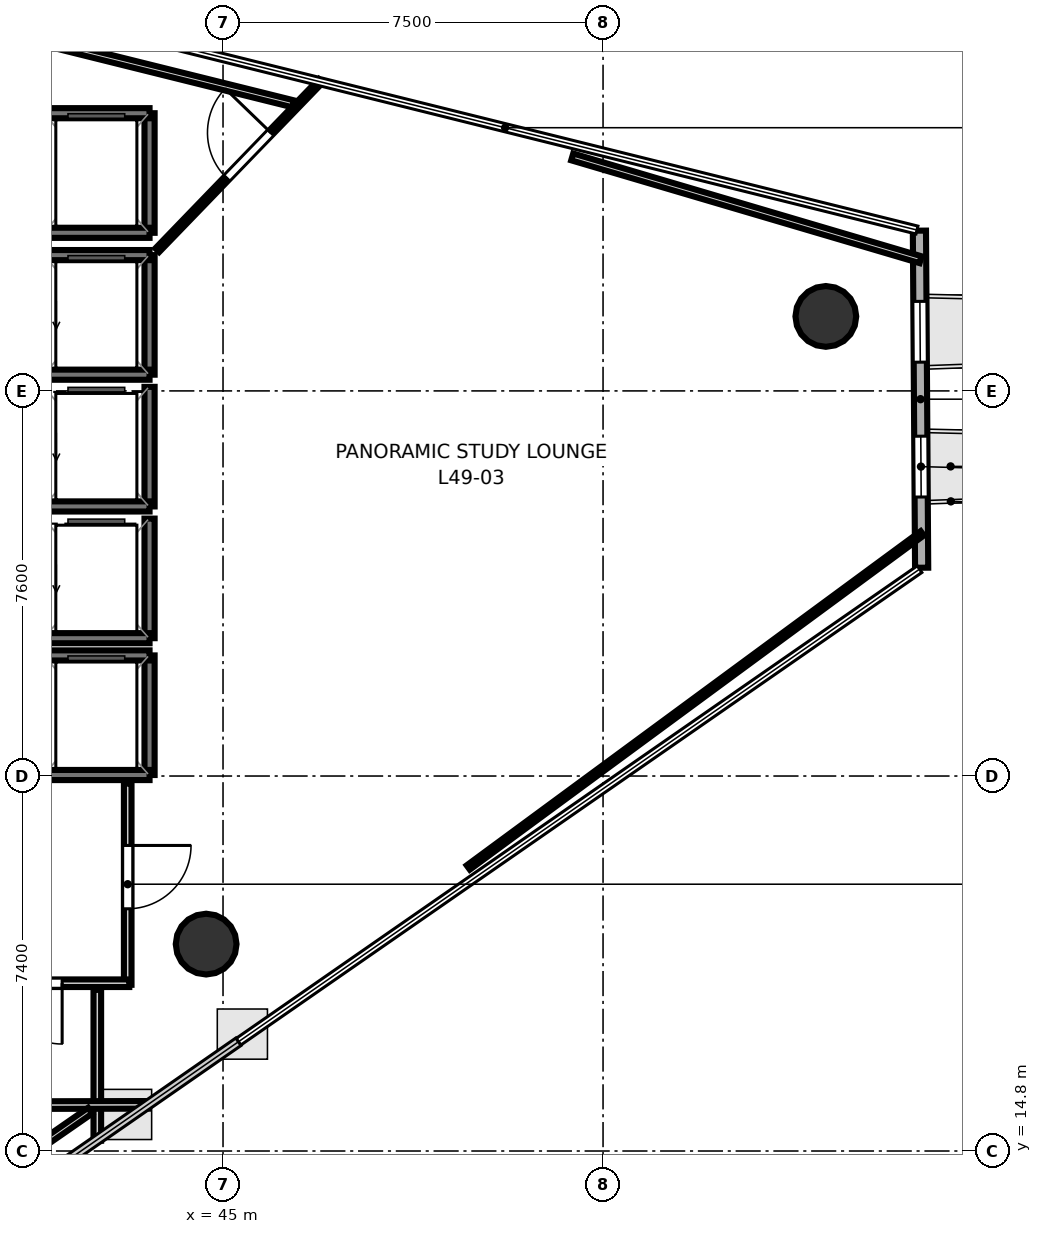
"""IFC4 building model, lengths in metres.
Left out: names, types, materials, properties, quantities, classifications, styles, units other than length and angle.
Written with IfcOpenShell. Run it as: python <this file> out.ifc"""

import sys

from ifc_helpers import new_model, si_unit, direction, frame, frame_2d, origin, origin_2d, place, context, subcontext, project, spatial, rectangle, hollow_circle, extrude, element, fill, save


model = new_model("IFC4")
c1 = context("Model", 3, precision=1e-05, world=origin(), true_north=direction((0.0, 1.0)))
c2 = subcontext(c1, "Body", "Model", "MODEL_VIEW")
j1 = project(units=[si_unit("LENGTHUNIT", "METRE"), si_unit("PLANEANGLEUNIT", "RADIAN")], contexts=[c1])
p1 = place(None, origin())
s1 = spatial("IfcSite", under=j1, at=p1, CompositionType="ELEMENT")
p2 = place(p1, origin())
s2 = spatial("IfcBuilding", under=s1, at=p2, CompositionType="ELEMENT")
p3 = place(p2, frame((0.0, 0.0, 192.9)))
s3 = spatial("IfcBuildingStorey", under=s2, at=p3, CompositionType="ELEMENT", Elevation=192.9)
for number, where, z_axis, x_axis in (
    (1, (56.897, 31.27, 0.0), (0.0, 0.0, 1.0), (1.0, 0.0, 0.0)),
    (2, (44.667, 18.883, 0.0), (0.0, 0.0, 1.0), (1.0, 0.0, 0.0)),
):
    element("IfcColumn", number, at=place(p3, frame(where, z_axis=z_axis, x_axis=x_axis)), inside=s3, PredefinedType="COLUMN", context=c2, shape_type="SweptSolid", body=[
        extrude(hollow_circle(Radius=0.6, WallThickness=0.03, at=origin_2d()), origin(), (0.0, 0.0, 1.0), 3.7),
    ])
p4 = place(p3, frame((58.788, 26.311, 0.0), z_axis=(0.0, 0.0, 1.0), x_axis=(-0.006569629932, 0.999978419748, 0.0)))
e3 = element("IfcWall", 3, at=p4, inside=s3, PredefinedType="SOLIDWALL", context=c2, shape_type="SweptSolid", body=[
    extrude(rectangle(XDim=6.652, YDim=0.26, at=frame_2d((3.326, 0.0))), origin(), (0.0, 0.0, 1.0), 3.52),
])
p5 = place(p4, frame((1.396, 0.0, 0.9)))
e4 = element("IfcOpeningElement", 4, at=p5, cuts=e3, PredefinedType="OPENING", context=c2, shape_type="SweptSolid", body=[
    extrude(rectangle(XDim=1.2, YDim=2.0, at=frame_2d((0.6, 1.0))), frame((0.0, 0.14, 0.0), z_axis=(0.0, -1.0, 0.0), x_axis=(1.0, 0.0, 0.0)), (0.0, 0.0, 1.0), 0.28),
])
p6 = place(p4, frame((4.056, 0.0, 0.9)))
e5 = element("IfcOpeningElement", 5, at=p6, cuts=e3, PredefinedType="OPENING", context=c2, shape_type="SweptSolid", body=[
    extrude(rectangle(XDim=1.2, YDim=2.0, at=frame_2d((0.6, 1.0))), frame((0.0, 0.14, 0.0), z_axis=(0.0, -1.0, 0.0), x_axis=(1.0, 0.0, 0.0)), (0.0, 0.0, 1.0), 0.28),
])
p7 = place(p3, frame((43.55, 30.12, 0.0), z_axis=(0.0, 0.0, 1.0), x_axis=(0.0, 1.0, 0.0)))
e6 = element("IfcWall", 6, at=p7, inside=s3, PredefinedType="SOLIDWALL", context=c2, shape_type="SweptSolid", body=[
    extrude(rectangle(XDim=2.36, YDim=0.2, at=frame_2d((1.18, 0.0))), origin(), (0.0, 0.0, 1.0), 3.52),
])
for number, where, z_axis, x_axis in (
    (7, (41.45, 32.48, 0.0), (0.0, 0.0, 1.0), (1.0, 0.0, 0.0)),
    (8, (41.45, 30.12, 0.0), (0.0, 0.0, 1.0), (1.0, 0.0, 0.0)),
):
    element("IfcWall", number, at=place(p3, frame(where, z_axis=z_axis, x_axis=x_axis)), inside=s3, PredefinedType="SOLIDWALL", context=c2, shape_type="SweptSolid", body=[
        extrude(rectangle(XDim=2.1, YDim=0.2, at=frame_2d((1.05, 0.0))), origin(), (0.0, 0.0, 1.0), 3.52),
    ])
p8 = place(p3, frame((43.55, 27.52, 0.0), z_axis=(0.0, 0.0, 1.0), x_axis=(0.0, 1.0, 0.0)))
e9 = element("IfcWall", 9, at=p8, inside=s3, PredefinedType="SOLIDWALL", context=c2, shape_type="SweptSolid", body=[
    extrude(rectangle(XDim=2.36, YDim=0.2, at=frame_2d((1.18, 0.0))), origin(), (0.0, 0.0, 1.0), 3.52),
])
p9 = place(p3, frame((41.45, 27.52, 0.0), z_axis=(0.0, 0.0, 1.0), x_axis=(1.0, 0.0, 0.0)))
e10 = element("IfcWall", 10, at=p9, inside=s3, PredefinedType="SOLIDWALL", context=c2, shape_type="SweptSolid", body=[
    extrude(rectangle(XDim=2.1, YDim=0.2, at=frame_2d((1.05, 0.0))), origin(), (0.0, 0.0, 1.0), 3.52),
])
p10 = place(p3, frame((43.55, 24.92, 0.0), z_axis=(0.0, 0.0, 1.0), x_axis=(0.0, 1.0, 0.0)))
e11 = element("IfcWall", 11, at=p10, inside=s3, PredefinedType="SOLIDWALL", context=c2, shape_type="SweptSolid", body=[
    extrude(rectangle(XDim=2.36, YDim=0.2, at=frame_2d((1.18, 0.0))), origin(), (0.0, 0.0, 1.0), 3.52),
])
p11 = place(p3, frame((41.45, 24.92, 0.0), z_axis=(0.0, 0.0, 1.0), x_axis=(1.0, 0.0, 0.0)))
e12 = element("IfcWall", 12, at=p11, inside=s3, PredefinedType="SOLIDWALL", context=c2, shape_type="SweptSolid", body=[
    extrude(rectangle(XDim=2.1, YDim=0.2, at=frame_2d((1.05, 0.0))), origin(), (0.0, 0.0, 1.0), 3.52),
])
p12 = place(p3, frame((43.55, 22.22, 0.0), z_axis=(0.0, 0.0, 1.0), x_axis=(0.0, 1.0, 0.0)))
e13 = element("IfcWall", 13, at=p12, inside=s3, PredefinedType="SOLIDWALL", context=c2, shape_type="SweptSolid", body=[
    extrude(rectangle(XDim=2.36, YDim=0.2, at=frame_2d((1.18, 0.0))), origin(), (0.0, 0.0, 1.0), 3.52),
])
for number, where, z_axis, x_axis in (
    (14, (41.45, 24.58, 0.0), (0.0, 0.0, 1.0), (1.0, 0.0, 0.0)),
    (15, (41.45, 22.22, 0.0), (0.0, 0.0, 1.0), (1.0, 0.0, 0.0)),
):
    element("IfcWall", number, at=place(p3, frame(where, z_axis=z_axis, x_axis=x_axis)), inside=s3, PredefinedType="SOLIDWALL", context=c2, shape_type="SweptSolid", body=[
        extrude(rectangle(XDim=2.1, YDim=0.2, at=frame_2d((1.05, 0.0))), origin(), (0.0, 0.0, 1.0), 3.52),
    ])
p13 = place(p3, frame((43.55, 32.92, 0.0), z_axis=(0.0, 0.0, 1.0), x_axis=(0.0, 1.0, 0.0)))
e16 = element("IfcWall", 16, at=p13, inside=s3, PredefinedType="SOLIDWALL", context=c2, shape_type="SweptSolid", body=[
    extrude(rectangle(XDim=2.36, YDim=0.2, at=frame_2d((1.18, 0.0))), origin(), (0.0, 0.0, 1.0), 3.52),
])
for number, where, z_axis, x_axis in (
    (17, (41.45, 35.28, 0.0), (0.0, 0.0, 1.0), (1.0, 0.0, 0.0)),
    (18, (41.45, 32.92, 0.0), (0.0, 0.0, 1.0), (1.0, 0.0, 0.0)),
):
    element("IfcWall", number, at=place(p3, frame(where, z_axis=z_axis, x_axis=x_axis)), inside=s3, PredefinedType="SOLIDWALL", context=c2, shape_type="SweptSolid", body=[
        extrude(rectangle(XDim=2.1, YDim=0.2, at=frame_2d((1.05, 0.0))), origin(), (0.0, 0.0, 1.0), 3.52),
    ])
p14 = place(p3, frame((43.119, 22.05, 0.0), z_axis=(0.0, 0.0, 1.0), x_axis=(0.0, -1.0, 0.0)))
e19 = element("IfcWall", 19, at=p14, inside=s3, PredefinedType="PARTITIONING", context=c2, shape_type="SweptSolid", body=[
    extrude(rectangle(XDim=3.97, YDim=0.15, at=frame_2d((1.985, 0.0))), origin(), (0.0, 0.0, 1.0), 2.84),
])
p15 = place(p14, frame((1.22, 0.0, 0.0)))
e20 = element("IfcOpeningElement", 20, at=p15, cuts=e19, PredefinedType="OPENING", context=c2, shape_type="SweptSolid", body=[
    extrude(rectangle(XDim=1.25, YDim=2.2, at=frame_2d((0.625, 1.1))), frame((0.0, 0.085, 0.0), z_axis=(0.0, -1.0, 0.0), x_axis=(1.0, 0.0, 0.0)), (0.0, 0.0, 1.0), 0.17),
])
p16 = place(p3, frame((43.15, 18.111, 0.0), z_axis=(0.0, 0.0, 1.0), x_axis=(-1.0, 0.0, 0.0)))
e21 = element("IfcWall", 21, at=p16, inside=s3, PredefinedType="PARTITIONING", context=c2, shape_type="SweptSolid", body=[
    extrude(rectangle(XDim=2.73, YDim=0.15, at=frame_2d((1.365, 0.0))), origin(), (0.0, 0.0, 1.0), 2.84),
])
p17 = place(p16, frame((1.325, 0.0, 0.0)))
e22 = element("IfcOpeningElement", 22, at=p17, cuts=e21, PredefinedType="OPENING", context=c2, shape_type="SweptSolid", body=[
    extrude(rectangle(XDim=1.2, YDim=2.15, at=frame_2d((0.6, 1.075))), frame((0.0, 0.085, 0.0), z_axis=(0.0, -1.0, 0.0), x_axis=(1.0, 0.0, 0.0)), (0.0, 0.0, 1.0), 0.17),
])
p18 = place(p3, frame((42.519, 17.98, 0.0), z_axis=(0.0, 0.0, 1.0), x_axis=(0.0, -1.0, 0.0)))
e23 = element("IfcWall", 23, at=p18, inside=s3, PredefinedType="PARTITIONING", context=c2, shape_type="SweptSolid", body=[
    extrude(rectangle(XDim=2.977, YDim=0.15, at=frame_2d((1.488, 0.0))), origin(), (0.0, 0.0, 1.0), 2.84),
])
p19 = place(p3, frame((43.53, 15.711, 0.0), z_axis=(0.0, 0.0, 1.0), x_axis=(-0.999998062252, -0.00196862718, 0.0)))
e24 = element("IfcWall", 24, at=p19, inside=s3, PredefinedType="PARTITIONING", context=c2, shape_type="SweptSolid", body=[
    extrude(rectangle(XDim=15.13, YDim=0.15, at=frame_2d((7.565, 0.0))), origin(), (0.0, 0.0, 1.0), 2.84),
])
p20 = place(p19, frame((5.813, 0.0, 0.0)))
e25 = element("IfcOpeningElement", 25, at=p20, cuts=e24, PredefinedType="OPENING", context=c2, shape_type="SweptSolid", body=[
    extrude(rectangle(XDim=1.25, YDim=2.2, at=frame_2d((0.625, 1.1))), frame((0.0, 0.085, 0.0), z_axis=(0.0, -1.0, 0.0), x_axis=(1.0, 0.0, 0.0)), (0.0, 0.0, 1.0), 0.17),
])
p21 = place(p3, frame((42.377, 15.595, 0.0), z_axis=(0.0, 0.0, 1.0), x_axis=(-0.821614609727, -0.570043360704, 0.0)))
e26 = element("IfcWall", 26, at=p21, inside=s3, PredefinedType="PARTITIONING", context=c2, shape_type="SweptSolid", body=[
    extrude(rectangle(XDim=8.543, YDim=0.14, at=frame_2d((4.271, 0.0))), origin(), (0.0, 0.0, 1.0), 2.84),
])
p22 = place(p3, frame((43.702, 32.576, 0.0), z_axis=(0.0, 0.0, 1.0), x_axis=(0.694641433789, 0.719356155506, 0.0)))
e27 = element("IfcWall", 27, at=p22, inside=s3, PredefinedType="PARTITIONING", context=c2, shape_type="SweptSolid", body=[
    extrude(rectangle(XDim=4.643, YDim=0.105, at=frame_2d((2.321, 0.0))), origin(), (0.0, 0.0, 1.0), 2.84),
])
p23 = place(p22, frame((1.976, 0.0, 0.0)))
e28 = element("IfcOpeningElement", 28, at=p23, cuts=e27, PredefinedType="OPENING", context=c2, shape_type="SweptSolid", body=[
    extrude(rectangle(XDim=1.25, YDim=2.2, at=frame_2d((0.625, 1.1))), frame((0.0, 0.062, 0.0), z_axis=(0.0, -1.0, 0.0), x_axis=(1.0, 0.0, 0.0)), (0.0, 0.0, 1.0), 0.125),
])
p24 = place(p3, frame((51.892, 34.418, 0.0), z_axis=(0.0, 0.0, 1.0), x_axis=(0.959115663903, -0.283014387012, 0.0)))
e29 = element("IfcWall", 29, at=p24, inside=s3, PredefinedType="PARTITIONING", context=c2, shape_type="SweptSolid", body=[
    extrude(rectangle(XDim=7.168, YDim=0.14, at=frame_2d((3.584, 0.0))), origin(), (0.0, 0.0, 1.0), 2.84),
])
p25 = place(p3, frame((58.8, 26.99, 0.0), z_axis=(0.0, 0.0, 1.0), x_axis=(-0.805363512082, -0.592781252578, 0.0)))
e30 = element("IfcWall", 30, at=p25, inside=s3, PredefinedType="PARTITIONING", context=c2, shape_type="SweptSolid", body=[
    extrude(rectangle(XDim=11.125, YDim=0.105, at=frame_2d((5.562, 0.0))), origin(), (0.0, 0.0, 1.0), 2.84),
])
p26 = place(p3, frame((37.222, 37.742, 0.0), z_axis=(0.0, 0.0, 1.0), x_axis=(0.97049288978, -0.241129738703, 0.0)))
e31 = element("IfcWall", 31, at=p26, inside=s3, PredefinedType="PARTITIONING", context=c2, shape_type="SweptSolid", body=[
    extrude(rectangle(XDim=9.44, YDim=0.14, at=frame_2d((4.72, 0.0))), origin(), (0.0, 0.0, 1.0), 2.84),
])
p27 = place(p17, origin())
e32 = element("IfcDoor", 32, at=p27, inside=s3, OperationType="SINGLE_SWING_LEFT", PredefinedType="DOOR", context=c2, shape_type="SweptSolid", body=[
    extrude(rectangle(XDim=1.2, YDim=2.15, at=frame_2d((0.6, 1.075))), frame((0.0, 0.025, 0.0), z_axis=(0.0, -1.0, 0.0), x_axis=(1.0, 0.0, 0.0)), (0.0, 0.0, 1.0), 0.05),
])
fill(e22, e32)
p28 = place(p15, origin())
e33 = element("IfcDoor", 33, at=p28, inside=s3, OperationType="SINGLE_SWING_LEFT", PredefinedType="DOOR", context=c2, shape_type="SweptSolid", body=[
    extrude(rectangle(XDim=1.25, YDim=2.2, at=frame_2d((0.625, 1.1))), frame((0.0, 0.025, 0.0), z_axis=(0.0, -1.0, 0.0), x_axis=(1.0, 0.0, 0.0)), (0.0, 0.0, 1.0), 0.05),
])
fill(e20, e33)
p29 = place(p23, origin())
e34 = element("IfcDoor", 34, at=p29, inside=s3, OperationType="SINGLE_SWING_RIGHT", PredefinedType="DOOR", context=c2, shape_type="SweptSolid", body=[
    extrude(rectangle(XDim=1.25, YDim=2.2, at=frame_2d((0.625, 1.1))), frame((0.0, 0.025, 0.0), z_axis=(0.0, -1.0, 0.0), x_axis=(1.0, 0.0, 0.0)), (0.0, 0.0, 1.0), 0.05),
])
fill(e28, e34)
p30 = place(p5, origin())
e35 = element("IfcWindow", 35, at=p30, inside=s3, PartitioningType="SINGLE_PANEL", PredefinedType="WINDOW", context=c2, shape_type="SweptSolid", body=[
    extrude(rectangle(XDim=1.2, YDim=2.0, at=frame_2d((0.6, 1.0))), frame((0.0, 0.03, 0.0), z_axis=(0.0, -1.0, 0.0), x_axis=(1.0, 0.0, 0.0)), (0.0, 0.0, 1.0), 0.06),
])
fill(e4, e35)
p31 = place(p6, origin())
e36 = element("IfcWindow", 36, at=p31, inside=s3, PartitioningType="SINGLE_PANEL", PredefinedType="WINDOW", context=c2, shape_type="SweptSolid", body=[
    extrude(rectangle(XDim=1.2, YDim=2.0, at=frame_2d((0.6, 1.0))), frame((0.0, 0.03, 0.0), z_axis=(0.0, -1.0, 0.0), x_axis=(1.0, 0.0, 0.0)), (0.0, 0.0, 1.0), 0.06),
])
fill(e5, e36)
save(model, sys.argv[1])
